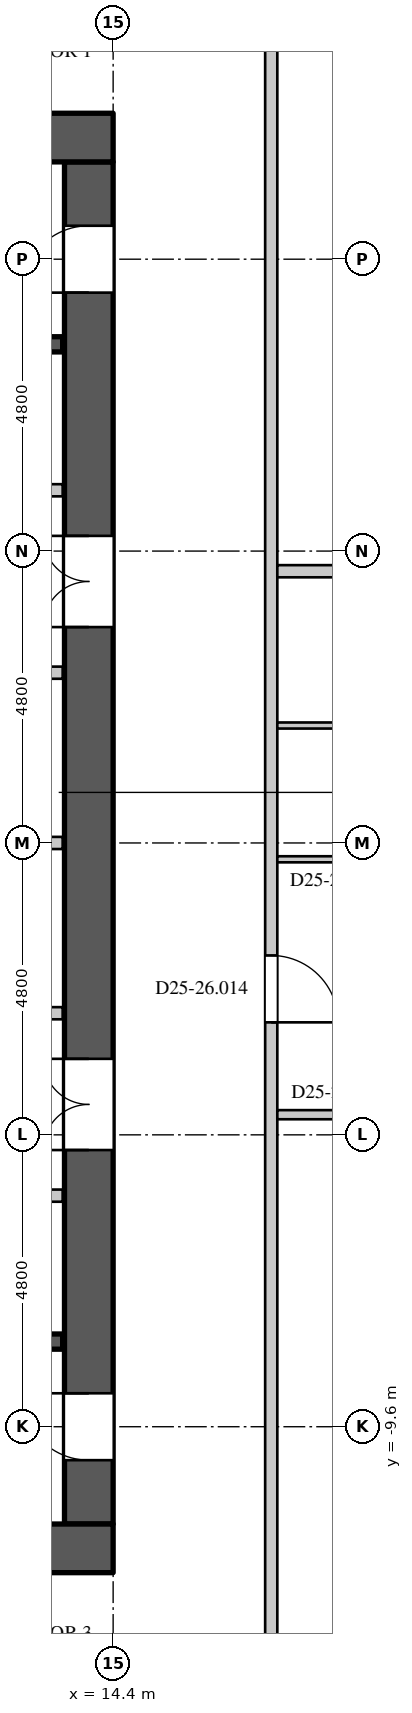
"""IFC4 building model, lengths in metres.
Left out: names, types, materials, properties, quantities, classifications, styles, units other than length and angle.
Written with IfcOpenShell. Run it as: python <this file> out.ifc"""

import sys

from ifc_helpers import new_model, si_unit, direction, frame, frame_2d, origin, place, context, subcontext, project, spatial, rectangle, extrude, element, fill, save


model = new_model("IFC4")
c1 = context("Model", 3, precision=1e-05, world=origin(), true_north=direction((0.0, 1.0)))
c2 = subcontext(c1, "Body", "Model", "MODEL_VIEW")
j1 = project(units=[si_unit("LENGTHUNIT", "METRE"), si_unit("PLANEANGLEUNIT", "RADIAN")], contexts=[c1])
p1 = place(None, origin())
s1 = spatial("IfcSite", under=j1, at=p1, CompositionType="ELEMENT")
p2 = place(p1, origin())
s2 = spatial("IfcBuilding", under=s1, at=p2, CompositionType="ELEMENT")
p3 = place(p2, frame((0.0, 0.0, 110.7)))
s3 = spatial("IfcBuildingStorey", under=s2, at=p3, CompositionType="ELEMENT", Elevation=110.7)
for number, where, z_axis, x_axis in (
    (1, (-14.4, 11.6, 0.0), (0.0, 0.0, 1.0), (1.0, 0.0, 0.0)),
    (2, (-14.4, -11.6, 0.0), (0.0, 0.0, 1.0), (1.0, 0.0, 0.0)),
):
    element("IfcWall", number, at=place(p3, frame(where, z_axis=z_axis, x_axis=x_axis)), inside=s3, PredefinedType="SHEAR", context=c2, shape_type="SweptSolid", body=[
        extrude(rectangle(XDim=28.8, YDim=0.8, at=frame_2d((14.4, 0.0))), origin(), (0.0, 0.0, 1.0), 4.2),
    ])
p4 = place(p3, frame((14.0, -11.2, 0.0), z_axis=(0.0, 0.0, 1.0), x_axis=(0.0, 1.0, 0.0)))
e3 = element("IfcWall", 3, at=p4, inside=s3, PredefinedType="SHEAR", context=c2, shape_type="SweptSolid", body=[
    extrude(rectangle(XDim=22.4, YDim=0.8, at=frame_2d((11.2, 0.0))), origin(), (0.0, 0.0, 1.0), 4.2),
])
p5 = place(p4, frame((20.25, 0.0, 0.0)))
e4 = element("IfcOpeningElement", 4, at=p5, cuts=e3, PredefinedType="OPENING", context=c2, shape_type="SweptSolid", body=[
    extrude(rectangle(XDim=1.1, YDim=2.2, at=frame_2d((0.55, 1.1))), frame((0.0, 0.41, 0.0), z_axis=(0.0, -1.0, 0.0), x_axis=(1.0, 0.0, 0.0)), (0.0, 0.0, 1.0), 0.82),
])
p6 = place(p4, frame((1.05, 0.0, 0.0)))
e5 = element("IfcOpeningElement", 5, at=p6, cuts=e3, PredefinedType="OPENING", context=c2, shape_type="SweptSolid", body=[
    extrude(rectangle(XDim=1.1, YDim=2.2, at=frame_2d((0.55, 1.1))), frame((0.0, 0.41, 0.0), z_axis=(0.0, -1.0, 0.0), x_axis=(1.0, 0.0, 0.0)), (0.0, 0.0, 1.0), 0.82),
])
p7 = place(p4, frame((14.75, 0.0, 0.0)))
e6 = element("IfcOpeningElement", 6, at=p7, cuts=e3, PredefinedType="OPENING", context=c2, shape_type="SweptSolid", body=[
    extrude(rectangle(XDim=1.5, YDim=2.4, at=frame_2d((0.75, 1.2))), frame((0.0, 0.41, 0.0), z_axis=(0.0, -1.0, 0.0), x_axis=(1.0, 0.0, 0.0)), (0.0, 0.0, 1.0), 0.82),
])
p8 = place(p4, frame((6.15, 0.0, 0.0)))
e7 = element("IfcOpeningElement", 7, at=p8, cuts=e3, PredefinedType="OPENING", context=c2, shape_type="SweptSolid", body=[
    extrude(rectangle(XDim=1.5, YDim=2.4, at=frame_2d((0.75, 1.2))), frame((0.0, 0.41, 0.0), z_axis=(0.0, -1.0, 0.0), x_axis=(1.0, 0.0, 0.0)), (0.0, 0.0, 1.0), 0.82),
])
p9 = place(p3, frame((9.02, 5.8, 0.0), z_axis=(0.0, 0.0, 1.0), x_axis=(1.0, 0.0, 0.0)))
e8 = element("IfcWall", 8, at=p9, inside=s3, PredefinedType="PARTITIONING", context=c2, shape_type="SweptSolid", body=[
    extrude(rectangle(XDim=4.55, YDim=0.2, at=frame_2d((2.275, 0.0))), origin(), (0.0, 0.0, 1.0), 3.95),
])
p10 = place(p9, frame((1.8, 0.0, 0.0)))
e9 = element("IfcOpeningElement", 9, at=p10, cuts=e8, PredefinedType="OPENING", context=c2, shape_type="SweptSolid", body=[
    extrude(rectangle(XDim=0.9, YDim=2.2, at=frame_2d((0.45, 1.1))), frame((0.0, 0.11, 0.0), z_axis=(0.0, -1.0, 0.0), x_axis=(1.0, 0.0, 0.0)), (0.0, 0.0, 1.0), 0.22),
])
p11 = place(p3, frame((17.0, -14.5, 0.0), z_axis=(0.0, 0.0, 1.0), x_axis=(0.0, 1.0, 0.0)))
e10 = element("IfcWall", 10, at=p11, inside=s3, PredefinedType="PARTITIONING", context=c2, shape_type="SweptSolid", body=[
    extrude(rectangle(XDim=29.0, YDim=0.2, at=frame_2d((14.5, 0.0))), origin(), (0.0, 0.0, 1.0), 3.95),
])
p12 = place(p11, frame((11.55, 0.0, 0.0)))
e11 = element("IfcOpeningElement", 11, at=p12, cuts=e10, PredefinedType="OPENING", context=c2, shape_type="SweptSolid", body=[
    extrude(rectangle(XDim=1.1, YDim=2.4, at=frame_2d((0.55, 1.2))), frame((0.0, 0.11, 0.0), z_axis=(0.0, -1.0, 0.0), x_axis=(1.0, 0.0, 0.0)), (0.0, 0.0, 1.0), 0.22),
])
p13 = place(p3, frame((15.24, -17.777, 0.0), z_axis=(0.0, 0.0, 1.0), x_axis=(0.707120241298, 0.707093320819, 0.0)))
e12 = element("IfcWall", 12, at=p13, inside=s3, PredefinedType="PARTITIONING", context=c2, shape_type="SweptSolid", body=[
    extrude(rectangle(XDim=9.069, YDim=0.15, at=frame_2d((4.534, 0.0))), origin(), (0.0, 0.0, 1.0), 3.95),
])
p14 = place(p13, frame((5.1, 0.0, 0.0)))
e13 = element("IfcOpeningElement", 13, at=p14, cuts=e12, PredefinedType="OPENING", context=c2, shape_type="SweptSolid", body=[
    extrude(rectangle(XDim=0.95, YDim=2.2, at=frame_2d((0.475, 1.1))), frame((0.0, 0.085, 0.0), z_axis=(0.0, -1.0, 0.0), x_axis=(1.0, 0.0, 0.0)), (0.0, 0.0, 1.0), 0.17),
])
p15 = place(p13, frame((0.4, 0.0, 0.0)))
e14 = element("IfcOpeningElement", 14, at=p15, cuts=e12, PredefinedType="OPENING", context=c2, shape_type="SweptSolid", body=[
    extrude(rectangle(XDim=0.95, YDim=2.2, at=frame_2d((0.475, 1.1))), frame((0.0, 0.085, 0.0), z_axis=(0.0, -1.0, 0.0), x_axis=(1.0, 0.0, 0.0)), (0.0, 0.0, 1.0), 0.17),
])
p16 = place(p13, frame((7.9, 0.0, 0.0)))
e15 = element("IfcOpeningElement", 15, at=p16, cuts=e12, PredefinedType="OPENING", context=c2, shape_type="SweptSolid", body=[
    extrude(rectangle(XDim=0.95, YDim=2.2, at=frame_2d((0.475, 1.1))), frame((0.0, 0.085, 0.0), z_axis=(0.0, -1.0, 0.0), x_axis=(1.0, 0.0, 0.0)), (0.0, 0.0, 1.0), 0.17),
])
p17 = place(p3, frame((16.562, 16.456, 0.0), z_axis=(0.0, 0.0, 1.0), x_axis=(0.707123735134, -0.707089826832, 0.0)))
e16 = element("IfcWall", 16, at=p17, inside=s3, PredefinedType="PARTITIONING", context=c2, shape_type="SweptSolid", body=[
    extrude(rectangle(XDim=7.2, YDim=0.15, at=frame_2d((3.6, 0.0))), origin(), (0.0, 0.0, 1.0), 3.95),
])
p18 = place(p17, frame((3.25, 0.0, 0.0)))
e17 = element("IfcOpeningElement", 17, at=p18, cuts=e16, PredefinedType="OPENING", context=c2, shape_type="SweptSolid", body=[
    extrude(rectangle(XDim=0.95, YDim=2.2, at=frame_2d((0.475, 1.1))), frame((0.0, 0.085, 0.0), z_axis=(0.0, -1.0, 0.0), x_axis=(1.0, 0.0, 0.0)), (0.0, 0.0, 1.0), 0.17),
])
p19 = place(p3, frame((17.1, -4.469, 0.0), z_axis=(0.0, 0.0, 1.0), x_axis=(1.0, 0.0, 0.0)))
e18 = element("IfcWall", 18, at=p19, inside=s3, PredefinedType="PARTITIONING", context=c2, shape_type="SweptSolid", body=[
    extrude(rectangle(XDim=8.55, YDim=0.15, at=frame_2d((4.275, 0.0))), origin(), (0.0, 0.0, 1.0), 3.3),
])
p20 = place(p19, frame((1.85, 0.0, 0.0)))
e19 = element("IfcOpeningElement", 19, at=p20, cuts=e18, PredefinedType="OPENING", context=c2, shape_type="SweptSolid", body=[
    extrude(rectangle(XDim=0.95, YDim=2.2, at=frame_2d((0.475, 1.1))), frame((0.0, 0.085, 0.0), z_axis=(0.0, -1.0, 0.0), x_axis=(1.0, 0.0, 0.0)), (0.0, 0.0, 1.0), 0.17),
])
p21 = place(p3, frame((17.1, 4.469, 0.0), z_axis=(0.0, 0.0, 1.0), x_axis=(1.0, 0.0, 0.0)))
e20 = element("IfcWall", 20, at=p21, inside=s3, PredefinedType="PARTITIONING", context=c2, shape_type="SweptSolid", body=[
    extrude(rectangle(XDim=8.55, YDim=0.2, at=frame_2d((4.275, 0.0))), origin(), (0.0, 0.0, 1.0), 3.3),
])
p22 = place(p3, frame((5.42, -5.8, 0.0), z_axis=(0.0, 0.0, 1.0), x_axis=(1.0, 0.0, 0.0)))
e21 = element("IfcWall", 21, at=p22, inside=s3, PredefinedType="PARTITIONING", context=c2, shape_type="SweptSolid", body=[
    extrude(rectangle(XDim=8.15, YDim=0.2, at=frame_2d((4.075, 0.0))), origin(), (0.0, 0.0, 1.0), 3.95),
])
p23 = place(p22, frame((3.65, 0.0, 0.0)))
e22 = element("IfcOpeningElement", 22, at=p23, cuts=e21, PredefinedType="OPENING", context=c2, shape_type="SweptSolid", body=[
    extrude(rectangle(XDim=0.9, YDim=2.2, at=frame_2d((0.45, 1.1))), frame((0.0, 0.11, 0.0), z_axis=(0.0, -1.0, 0.0), x_axis=(1.0, 0.0, 0.0)), (0.0, 0.0, 1.0), 0.22),
])
p24 = place(p3, frame((10.38, -2.8, 0.0), z_axis=(0.0, 0.0, 1.0), x_axis=(1.0, 0.0, 0.0)))
e23 = element("IfcWall", 23, at=p24, inside=s3, PredefinedType="PARTITIONING", context=c2, shape_type="SweptSolid", body=[
    extrude(rectangle(XDim=3.19, YDim=0.2, at=frame_2d((1.595, 0.0))), origin(), (0.0, 0.0, 1.0), 3.95),
])
p25 = place(p24, frame((1.1, 0.0, 0.0)))
e24 = element("IfcOpeningElement", 24, at=p25, cuts=e23, PredefinedType="OPENING", context=c2, shape_type="SweptSolid", body=[
    extrude(rectangle(XDim=0.9, YDim=2.2, at=frame_2d((0.45, 1.1))), frame((0.0, 0.11, 0.0), z_axis=(0.0, -1.0, 0.0), x_axis=(1.0, 0.0, 0.0)), (0.0, 0.0, 1.0), 0.22),
])
p26 = place(p3, frame((10.4, 2.8, 0.0), z_axis=(0.0, 0.0, 1.0), x_axis=(1.0, 0.0, 0.0)))
e25 = element("IfcWall", 25, at=p26, inside=s3, PredefinedType="PARTITIONING", context=c2, shape_type="SweptSolid", body=[
    extrude(rectangle(XDim=3.17, YDim=0.2, at=frame_2d((1.585, 0.0))), origin(), (0.0, 0.0, 1.0), 3.95),
])
p27 = place(p26, frame((1.25, 0.0, 0.0)))
e26 = element("IfcOpeningElement", 26, at=p27, cuts=e25, PredefinedType="OPENING", context=c2, shape_type="SweptSolid", body=[
    extrude(rectangle(XDim=0.6, YDim=2.0, at=frame_2d((0.3, 1.0))), frame((0.0, 0.11, 0.0), z_axis=(0.0, -1.0, 0.0), x_axis=(1.0, 0.0, 0.0)), (0.0, 0.0, 1.0), 0.22),
])
p28 = place(p3, frame((10.4, 0.0, 0.0), z_axis=(0.0, 0.0, 1.0), x_axis=(1.0, 0.0, 0.0)))
e27 = element("IfcWall", 27, at=p28, inside=s3, PredefinedType="PARTITIONING", context=c2, shape_type="SweptSolid", body=[
    extrude(rectangle(XDim=3.17, YDim=0.2, at=frame_2d((1.585, 0.0))), origin(), (0.0, 0.0, 1.0), 3.95),
])
p29 = place(p3, frame((5.525, -8.2, 0.0), z_axis=(0.0, 0.0, 1.0), x_axis=(1.0, 0.0, 0.0)))
e28 = element("IfcWall", 28, at=p29, inside=s3, PredefinedType="SHEAR", context=c2, shape_type="SweptSolid", body=[
    extrude(rectangle(XDim=8.045, YDim=0.25, at=frame_2d((4.022, 0.0))), origin(), (0.0, 0.0, 1.0), 3.95),
])
p30 = place(p3, frame((5.275, 8.2, 0.0), z_axis=(0.0, 0.0, 1.0), x_axis=(1.0, 0.0, 0.0)))
e29 = element("IfcWall", 29, at=p30, inside=s3, PredefinedType="SHEAR", context=c2, shape_type="SweptSolid", body=[
    extrude(rectangle(XDim=8.295, YDim=0.25, at=frame_2d((4.147, 0.0))), origin(), (0.0, 0.0, 1.0), 3.95),
])
p31 = place(p3, frame((17.1, -0.269, 0.0), z_axis=(0.0, 0.0, 1.0), x_axis=(1.0, 0.0, 0.0)))
e30 = element("IfcWall", 30, at=p31, inside=s3, PredefinedType="PARTITIONING", context=c2, shape_type="SweptSolid", body=[
    extrude(rectangle(XDim=3.65, YDim=0.1, at=frame_2d((1.825, 0.0))), origin(), (0.0, 0.0, 1.0), 3.95),
])
p32 = place(p31, frame((1.85, 0.0, 0.0)))
e31 = element("IfcOpeningElement", 31, at=p32, cuts=e30, PredefinedType="OPENING", context=c2, shape_type="SweptSolid", body=[
    extrude(rectangle(XDim=0.9, YDim=2.2, at=frame_2d((0.45, 1.1))), frame((0.0, 0.06, 0.0), z_axis=(0.0, -1.0, 0.0), x_axis=(1.0, 0.0, 0.0)), (0.0, 0.0, 1.0), 0.12),
])
p33 = place(p3, frame((17.1, 1.931, 0.0), z_axis=(0.0, 0.0, 1.0), x_axis=(1.0, 0.0, 0.0)))
e32 = element("IfcWall", 32, at=p33, inside=s3, PredefinedType="PARTITIONING", context=c2, shape_type="SweptSolid", body=[
    extrude(rectangle(XDim=3.65, YDim=0.1, at=frame_2d((1.825, 0.0))), origin(), (0.0, 0.0, 1.0), 3.95),
])
p34 = place(p5, origin())
e33 = element("IfcDoor", 33, at=p34, inside=s3, OperationType="SINGLE_SWING_LEFT", PredefinedType="DOOR", context=c2, shape_type="SweptSolid", body=[
    extrude(rectangle(XDim=1.1, YDim=2.2, at=frame_2d((0.55, 1.1))), frame((0.0, 0.395, 0.0), z_axis=(0.0, -1.0, 0.0), x_axis=(1.0, 0.0, 0.0)), (0.0, 0.0, 1.0), 0.05),
])
fill(e4, e33)
p35 = place(p6, origin())
e34 = element("IfcDoor", 34, at=p35, inside=s3, OperationType="SINGLE_SWING_RIGHT", PredefinedType="DOOR", context=c2, shape_type="SweptSolid", body=[
    extrude(rectangle(XDim=1.1, YDim=2.2, at=frame_2d((0.55, 1.1))), frame((0.0, 0.395, 0.0), z_axis=(0.0, -1.0, 0.0), x_axis=(1.0, 0.0, 0.0)), (0.0, 0.0, 1.0), 0.05),
])
fill(e5, e34)
p36 = place(p7, origin())
e35 = element("IfcDoor", 35, at=p36, inside=s3, OperationType="DOUBLE_DOOR_SINGLE_SWING", PredefinedType="DOOR", context=c2, shape_type="SweptSolid", body=[
    extrude(rectangle(XDim=1.5, YDim=2.4, at=frame_2d((0.75, 1.2))), frame((0.0, 0.395, 0.0), z_axis=(0.0, -1.0, 0.0), x_axis=(1.0, 0.0, 0.0)), (0.0, 0.0, 1.0), 0.05),
])
fill(e6, e35)
p37 = place(p8, origin())
e36 = element("IfcDoor", 36, at=p37, inside=s3, OperationType="DOUBLE_DOOR_SINGLE_SWING", PredefinedType="DOOR", context=c2, shape_type="SweptSolid", body=[
    extrude(rectangle(XDim=1.5, YDim=2.4, at=frame_2d((0.75, 1.2))), frame((0.0, 0.395, 0.0), z_axis=(0.0, -1.0, 0.0), x_axis=(1.0, 0.0, 0.0)), (0.0, 0.0, 1.0), 0.05),
])
fill(e7, e36)
p38 = place(p12, origin())
e37 = element("IfcDoor", 37, at=p38, inside=s3, OperationType="SINGLE_SWING_RIGHT", PredefinedType="DOOR", context=c2, shape_type="SweptSolid", body=[
    extrude(rectangle(XDim=1.1, YDim=2.4, at=frame_2d((0.55, 1.2))), frame((0.0, 0.025, 0.0), z_axis=(0.0, -1.0, 0.0), x_axis=(1.0, 0.0, 0.0)), (0.0, 0.0, 1.0), 0.05),
])
fill(e11, e37)
save(model, sys.argv[1])
